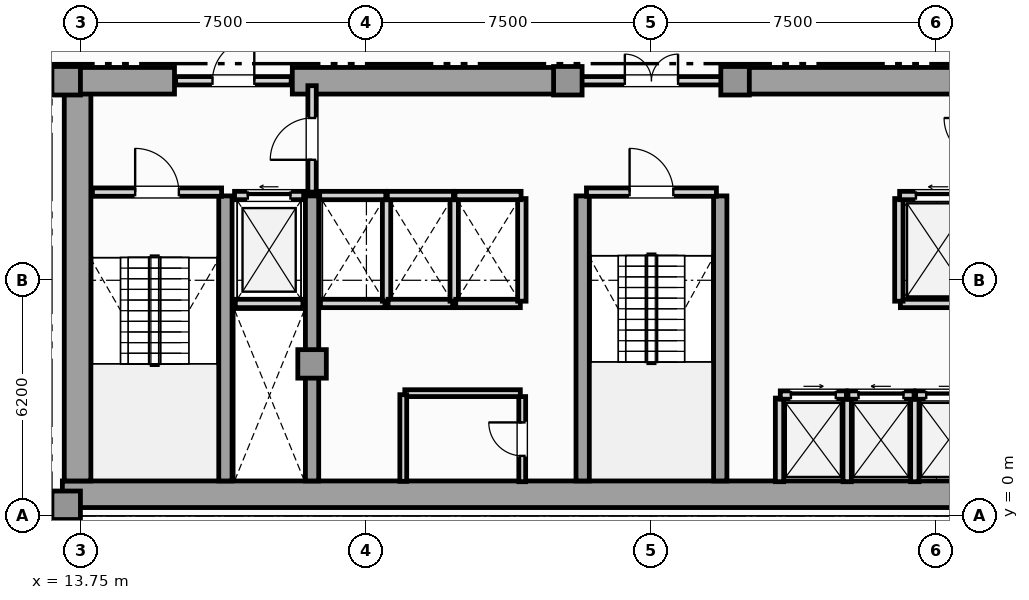
"""IFC4 building model, lengths in metres.
Left out: names, types, materials, properties, quantities, classifications, styles, units other than length and angle.
Written with IfcOpenShell. Run it as: python <this file> out.ifc"""

import sys

from ifc_helpers import new_model, si_unit, direction, frame, frame_2d, origin, origin_2d, place, context, subcontext, project, spatial, rectangle, extrude, element, fill, save


model = new_model("IFC4")
c1 = context("Model", 3, precision=1e-05, world=origin(), true_north=direction((0.0, 1.0)))
c2 = subcontext(c1, "Body", "Model", "MODEL_VIEW")
j1 = project(units=[si_unit("LENGTHUNIT", "METRE"), si_unit("PLANEANGLEUNIT", "RADIAN")], contexts=[c1])
p1 = place(None, origin())
s1 = spatial("IfcSite", under=j1, at=p1, CompositionType="ELEMENT")
p2 = place(p1, origin())
s2 = spatial("IfcBuilding", under=s1, at=p2, CompositionType="ELEMENT")
p3 = place(p2, frame((0.0, 0.0, 145.2)))
s3 = spatial("IfcBuildingStorey", under=s2, at=p3, CompositionType="ELEMENT", Elevation=145.2)
p4 = place(p3, frame((13.25, 0.57, 0.0), z_axis=(0.0, 0.0, 1.0), x_axis=(1.0, 0.0, 0.0)))
e1 = element("IfcWall", 1, at=p4, inside=s3, PredefinedType="SHEAR", context=c2, shape_type="SweptSolid", body=[
    extrude(rectangle(XDim=31.0, YDim=0.7, at=frame_2d((15.5, 0.0))), origin(), (0.0, 0.0, 1.0), 3.63),
])
p5 = place(p3, frame((13.65, 0.92, 0.0), z_axis=(0.0, 0.0, 1.0), x_axis=(0.0, 1.0, 0.0)))
e2 = element("IfcWall", 2, at=p5, inside=s3, PredefinedType="SHEAR", context=c2, shape_type="SweptSolid", body=[
    extrude(rectangle(XDim=10.53, YDim=0.7, at=frame_2d((5.265, 0.0))), origin(), (0.0, 0.0, 1.0), 3.63),
])
p6 = place(p3, frame((13.25, 11.45, 0.0), z_axis=(0.0, 0.0, 1.0), x_axis=(1.0, 0.0, 0.0)))
e3 = element("IfcWall", 3, at=p6, inside=s3, PredefinedType="SHEAR", context=c2, shape_type="SweptSolid", body=[
    extrude(rectangle(XDim=2.95, YDim=0.7, at=frame_2d((1.475, 0.0))), origin(), (0.0, 0.0, 1.0), 3.63),
])
for number, where, z_axis, x_axis in (
    (4, (19.3, 11.45, 0.0), (0.0, 0.0, 1.0), (1.0, 0.0, 0.0)),
    (5, (30.9, 11.45, 0.0), (0.0, 0.0, 1.0), (1.0, 0.0, 0.0)),
):
    element("IfcWall", number, at=place(p3, frame(where, z_axis=z_axis, x_axis=x_axis)), inside=s3, PredefinedType="SHEAR", context=c2, shape_type="SweptSolid", body=[
        extrude(rectangle(XDim=7.3, YDim=0.7, at=frame_2d((3.65, 0.0))), origin(), (0.0, 0.0, 1.0), 3.63),
    ])
for number, where, z_axis, x_axis in (
    (6, (17.54, 0.92, 0.0), (0.0, 0.0, 1.0), (0.0, 1.0, 0.0)),
    (7, (19.82, 0.92, 0.0), (0.0, 0.0, 1.0), (0.0, 1.0, 0.0)),
    (8, (26.94, 0.92, 0.0), (0.0, 0.0, 1.0), (0.0, 1.0, 0.0)),
    (9, (30.56, 0.92, 0.0), (0.0, 0.0, 1.0), (0.0, 1.0, 0.0)),
):
    element("IfcWall", number, at=place(p3, frame(where, z_axis=z_axis, x_axis=x_axis)), inside=s3, PredefinedType="SHEAR", context=c2, shape_type="SweptSolid", body=[
        extrude(rectangle(XDim=7.5, YDim=0.35, at=frame_2d((3.75, 0.0))), origin(), (0.0, 0.0, 1.0), 3.63),
    ])
for number, where, z_axis, x_axis in (
    (10, (13.35, 0.28, 0.0), (0.0, 0.0, 1.0), (1.0, 0.0, 0.0)),
    (11, (13.35, 11.45, 0.0), (0.0, 0.0, 1.0), (1.0, 0.0, 0.0)),
    (12, (19.82, 4.0, 0.0), (0.0, 0.0, 1.0), (1.0, 0.0, 0.0)),
    (13, (26.55, 11.45, 0.0), (0.0, 0.0, 1.0), (1.0, 0.0, 0.0)),
    (14, (30.95, 11.45, 0.0), (0.0, 0.0, 1.0), (1.0, 0.0, 0.0)),
):
    element("IfcColumn", number, at=place(p3, frame(where, z_axis=z_axis, x_axis=x_axis)), inside=s3, PredefinedType="COLUMN", context=c2, shape_type="SweptSolid", body=[
        extrude(rectangle(XDim=0.75, YDim=0.75, at=origin_2d()), origin(), (0.0, 0.0, 1.0), 3.85),
    ])
p7 = place(p3, frame((5.84, 0.18, 0.0), z_axis=(0.0, 0.0, 1.0), x_axis=(1.0, 0.0, 0.0)))
e15 = element("IfcWall", 15, at=p7, inside=s3, PredefinedType="SOLIDWALL", context=c2, shape_type="SweptSolid", body=[
    extrude(rectangle(XDim=7.41, YDim=0.3, at=frame_2d((3.705, 0.0))), origin(), (0.0, 0.0, 1.0), 3.63),
])
p8 = place(p7, frame((2.655, 0.0, 0.85)))
e16 = element("IfcOpeningElement", 16, at=p8, cuts=e15, PredefinedType="OPENING", context=c2, shape_type="SweptSolid", body=[
    extrude(rectangle(XDim=2.1, YDim=2.05, at=frame_2d((1.05, 1.025))), frame((0.0, 0.16, 0.0), z_axis=(0.0, -1.0, 0.0), x_axis=(1.0, 0.0, 0.0)), (0.0, 0.0, 1.0), 0.32),
])
p9 = place(p3, frame((17.8, 5.59, 0.0), z_axis=(0.0, 0.0, 1.0), x_axis=(1.0, 0.0, 0.0)))
e17 = element("IfcWall", 17, at=p9, inside=s3, PredefinedType="SOLIDWALL", context=c2, shape_type="SweptSolid", body=[
    extrude(rectangle(XDim=1.78, YDim=0.22, at=frame_2d((0.89, 0.0))), origin(), (0.0, 0.0, 1.0), 3.63),
])
p10 = place(p3, frame((17.78, 8.43, 0.0), z_axis=(0.0, 0.0, 1.0), x_axis=(1.0, 0.0, 0.0)))
e18 = element("IfcWall", 18, at=p10, inside=s3, PredefinedType="SOLIDWALL", context=c2, shape_type="SweptSolid", body=[
    extrude(rectangle(XDim=1.82, YDim=0.22, at=frame_2d((0.91, 0.0))), origin(), (0.0, 0.0, 1.0), 3.63),
])
p11 = place(p10, frame((0.35, 0.0, 0.0)))
e19 = element("IfcOpeningElement", 19, at=p11, cuts=e18, PredefinedType="OPENING", context=c2, shape_type="SweptSolid", body=[
    extrude(rectangle(XDim=1.12, YDim=2.25, at=frame_2d((0.56, 1.125))), frame((0.0, 0.12, 0.0), z_axis=(0.0, -1.0, 0.0), x_axis=(1.0, 0.0, 0.0)), (0.0, 0.0, 1.0), 0.24),
])
p12 = place(p3, frame((35.3, 5.59, 0.0), z_axis=(0.0, 0.0, 1.0), x_axis=(1.0, 0.0, 0.0)))
e20 = element("IfcWall", 20, at=p12, inside=s3, PredefinedType="SOLIDWALL", context=c2, shape_type="SweptSolid", body=[
    extrude(rectangle(XDim=2.0, YDim=0.22, at=frame_2d((1.0, 0.0))), origin(), (0.0, 0.0, 1.0), 3.63),
])
p13 = place(p3, frame((35.26, 5.65, 0.0), z_axis=(0.0, 0.0, 1.0), x_axis=(0.0, 1.0, 0.0)))
e21 = element("IfcWall", 21, at=p13, inside=s3, PredefinedType="SOLIDWALL", context=c2, shape_type="SweptSolid", body=[
    extrude(rectangle(XDim=2.7, YDim=0.22, at=frame_2d((1.35, 0.0))), origin(), (0.0, 0.0, 1.0), 3.63),
])
p14 = place(p3, frame((35.28, 8.43, 0.0), z_axis=(0.0, 0.0, 1.0), x_axis=(1.0, 0.0, 0.0)))
e22 = element("IfcWall", 22, at=p14, inside=s3, PredefinedType="SOLIDWALL", context=c2, shape_type="SweptSolid", body=[
    extrude(rectangle(XDim=2.04, YDim=0.22, at=frame_2d((1.02, 0.0))), origin(), (0.0, 0.0, 1.0), 3.63),
])
p15 = place(p14, frame((0.43, 0.0, 0.0)))
e23 = element("IfcOpeningElement", 23, at=p15, cuts=e22, PredefinedType="OPENING", context=c2, shape_type="SweptSolid", body=[
    extrude(rectangle(XDim=1.18, YDim=2.2, at=frame_2d((0.59, 1.1))), frame((0.0, 0.12, 0.0), z_axis=(0.0, -1.0, 0.0), x_axis=(1.0, 0.0, 0.0)), (0.0, 0.0, 1.0), 0.24),
])
for number, where, z_axis, x_axis in (
    (24, (32.12, 0.9, 0.0), (0.0, 0.0, 1.0), (0.0, 1.0, 0.0)),
    (25, (33.9, 0.9, 0.0), (0.0, 0.0, 1.0), (0.0, 1.0, 0.0)),
):
    element("IfcWall", number, at=place(p3, frame(where, z_axis=z_axis, x_axis=x_axis)), inside=s3, PredefinedType="SOLIDWALL", context=c2, shape_type="SweptSolid", body=[
        extrude(rectangle(XDim=2.2, YDim=0.22, at=frame_2d((1.1, 0.0))), origin(), (0.0, 0.0, 1.0), 3.63),
    ])
p16 = place(p3, frame((32.14, 3.18, 0.0), z_axis=(0.0, 0.0, 1.0), x_axis=(1.0, 0.0, 0.0)))
e26 = element("IfcWall", 26, at=p16, inside=s3, PredefinedType="SOLIDWALL", context=c2, shape_type="SweptSolid", body=[
    extrude(rectangle(XDim=1.74, YDim=0.22, at=frame_2d((0.87, 0.0))), origin(), (0.0, 0.0, 1.0), 3.63),
])
p17 = place(p16, frame((0.28, 0.0, 0.0)))
e27 = element("IfcOpeningElement", 27, at=p17, cuts=e26, PredefinedType="OPENING", context=c2, shape_type="SweptSolid", body=[
    extrude(rectangle(XDim=1.18, YDim=2.2, at=frame_2d((0.59, 1.1))), frame((0.0, 0.12, 0.0), z_axis=(0.0, -1.0, 0.0), x_axis=(1.0, 0.0, 0.0)), (0.0, 0.0, 1.0), 0.24),
])
p18 = place(p3, frame((35.68, 0.9, 0.0), z_axis=(0.0, 0.0, 1.0), x_axis=(0.0, 1.0, 0.0)))
e28 = element("IfcWall", 28, at=p18, inside=s3, PredefinedType="SOLIDWALL", context=c2, shape_type="SweptSolid", body=[
    extrude(rectangle(XDim=2.2, YDim=0.22, at=frame_2d((1.1, 0.0))), origin(), (0.0, 0.0, 1.0), 3.63),
])
p19 = place(p3, frame((33.92, 3.18, 0.0), z_axis=(0.0, 0.0, 1.0), x_axis=(1.0, 0.0, 0.0)))
e29 = element("IfcWall", 29, at=p19, inside=s3, PredefinedType="SOLIDWALL", context=c2, shape_type="SweptSolid", body=[
    extrude(rectangle(XDim=1.74, YDim=0.22, at=frame_2d((0.87, 0.0))), origin(), (0.0, 0.0, 1.0), 3.63),
])
p20 = place(p19, frame((0.28, 0.0, 0.0)))
e30 = element("IfcOpeningElement", 30, at=p20, cuts=e29, PredefinedType="OPENING", context=c2, shape_type="SweptSolid", body=[
    extrude(rectangle(XDim=1.18, YDim=2.2, at=frame_2d((0.59, 1.1))), frame((0.0, 0.12, 0.0), z_axis=(0.0, -1.0, 0.0), x_axis=(1.0, 0.0, 0.0)), (0.0, 0.0, 1.0), 0.24),
])
p21 = place(p3, frame((35.7, 3.18, 0.0), z_axis=(0.0, 0.0, 1.0), x_axis=(1.0, 0.0, 0.0)))
e31 = element("IfcWall", 31, at=p21, inside=s3, PredefinedType="SOLIDWALL", context=c2, shape_type="SweptSolid", body=[
    extrude(rectangle(XDim=1.74, YDim=0.22, at=frame_2d((0.87, 0.0))), origin(), (0.0, 0.0, 1.0), 3.63),
])
p22 = place(p21, frame((0.28, 0.0, 0.0)))
e32 = element("IfcOpeningElement", 32, at=p22, cuts=e31, PredefinedType="OPENING", context=c2, shape_type="SweptSolid", body=[
    extrude(rectangle(XDim=1.18, YDim=2.2, at=frame_2d((0.59, 1.1))), frame((0.0, 0.12, 0.0), z_axis=(0.0, -1.0, 0.0), x_axis=(1.0, 0.0, 0.0)), (0.0, 0.0, 1.0), 0.24),
])
p23 = place(p3, frame((20.04, 5.59, 0.0), z_axis=(0.0, 0.0, 1.0), x_axis=(1.0, 0.0, 0.0)))
e33 = element("IfcWall", 33, at=p23, inside=s3, PredefinedType="SOLIDWALL", context=c2, shape_type="SweptSolid", body=[
    extrude(rectangle(XDim=1.7, YDim=0.22, at=frame_2d((0.85, 0.0))), origin(), (0.0, 0.0, 1.0), 3.63),
])
p24 = place(p3, frame((21.78, 5.65, 0.0), z_axis=(0.0, 0.0, 1.0), x_axis=(0.0, 1.0, 0.0)))
e34 = element("IfcWall", 34, at=p24, inside=s3, PredefinedType="SOLIDWALL", context=c2, shape_type="SweptSolid", body=[
    extrude(rectangle(XDim=2.7, YDim=0.22, at=frame_2d((1.35, 0.0))), origin(), (0.0, 0.0, 1.0), 3.63),
])
p25 = place(p3, frame((20.02, 8.43, 0.0), z_axis=(0.0, 0.0, 1.0), x_axis=(1.0, 0.0, 0.0)))
e35 = element("IfcWall", 35, at=p25, inside=s3, PredefinedType="SOLIDWALL", context=c2, shape_type="SweptSolid", body=[
    extrude(rectangle(XDim=1.74, YDim=0.22, at=frame_2d((0.87, 0.0))), origin(), (0.0, 0.0, 1.0), 3.63),
])
p26 = place(p3, frame((21.82, 5.59, 0.0), z_axis=(0.0, 0.0, 1.0), x_axis=(1.0, 0.0, 0.0)))
e36 = element("IfcWall", 36, at=p26, inside=s3, PredefinedType="SOLIDWALL", context=c2, shape_type="SweptSolid", body=[
    extrude(rectangle(XDim=1.7, YDim=0.22, at=frame_2d((0.85, 0.0))), origin(), (0.0, 0.0, 1.0), 3.63),
])
p27 = place(p3, frame((23.56, 5.65, 0.0), z_axis=(0.0, 0.0, 1.0), x_axis=(0.0, 1.0, 0.0)))
e37 = element("IfcWall", 37, at=p27, inside=s3, PredefinedType="SOLIDWALL", context=c2, shape_type="SweptSolid", body=[
    extrude(rectangle(XDim=2.7, YDim=0.22, at=frame_2d((1.35, 0.0))), origin(), (0.0, 0.0, 1.0), 3.63),
])
p28 = place(p3, frame((21.8, 8.43, 0.0), z_axis=(0.0, 0.0, 1.0), x_axis=(1.0, 0.0, 0.0)))
e38 = element("IfcWall", 38, at=p28, inside=s3, PredefinedType="SOLIDWALL", context=c2, shape_type="SweptSolid", body=[
    extrude(rectangle(XDim=1.74, YDim=0.22, at=frame_2d((0.87, 0.0))), origin(), (0.0, 0.0, 1.0), 3.63),
])
p29 = place(p3, frame((23.6, 5.59, 0.0), z_axis=(0.0, 0.0, 1.0), x_axis=(1.0, 0.0, 0.0)))
e39 = element("IfcWall", 39, at=p29, inside=s3, PredefinedType="SOLIDWALL", context=c2, shape_type="SweptSolid", body=[
    extrude(rectangle(XDim=1.7, YDim=0.22, at=frame_2d((0.85, 0.0))), origin(), (0.0, 0.0, 1.0), 3.63),
])
p30 = place(p3, frame((25.34, 5.65, 0.0), z_axis=(0.0, 0.0, 1.0), x_axis=(0.0, 1.0, 0.0)))
e40 = element("IfcWall", 40, at=p30, inside=s3, PredefinedType="SOLIDWALL", context=c2, shape_type="SweptSolid", body=[
    extrude(rectangle(XDim=2.7, YDim=0.22, at=frame_2d((1.35, 0.0))), origin(), (0.0, 0.0, 1.0), 3.63),
])
p31 = place(p3, frame((23.58, 8.43, 0.0), z_axis=(0.0, 0.0, 1.0), x_axis=(1.0, 0.0, 0.0)))
e41 = element("IfcWall", 41, at=p31, inside=s3, PredefinedType="SOLIDWALL", context=c2, shape_type="SweptSolid", body=[
    extrude(rectangle(XDim=1.74, YDim=0.22, at=frame_2d((0.87, 0.0))), origin(), (0.0, 0.0, 1.0), 3.63),
])
p32 = place(p3, frame((14.04, 8.52, 0.0), z_axis=(0.0, 0.0, 1.0), x_axis=(1.0, 0.0, 0.0)))
e42 = element("IfcWall", 42, at=p32, inside=s3, PredefinedType="SOLIDWALL", context=c2, shape_type="SweptSolid", body=[
    extrude(rectangle(XDim=3.4, YDim=0.22, at=frame_2d((1.7, 0.0))), origin(), (0.0, 0.0, 1.0), 3.63),
])
p33 = place(p32, frame((1.125, 0.0, 0.0)))
e43 = element("IfcOpeningElement", 43, at=p33, cuts=e42, PredefinedType="OPENING", context=c2, shape_type="SweptSolid", body=[
    extrude(rectangle(XDim=1.15, YDim=2.2, at=frame_2d((0.575, 1.1))), frame((0.0, 0.12, 0.0), z_axis=(0.0, -1.0, 0.0), x_axis=(1.0, 0.0, 0.0)), (0.0, 0.0, 1.0), 0.24),
])
p34 = place(p3, frame((27.04, 8.52, 0.0), z_axis=(0.0, 0.0, 1.0), x_axis=(1.0, 0.0, 0.0)))
e44 = element("IfcWall", 44, at=p34, inside=s3, PredefinedType="SOLIDWALL", context=c2, shape_type="SweptSolid", body=[
    extrude(rectangle(XDim=3.42, YDim=0.22, at=frame_2d((1.71, 0.0))), origin(), (0.0, 0.0, 1.0), 3.63),
])
p35 = place(p34, frame((1.135, 0.0, 0.0)))
e45 = element("IfcOpeningElement", 45, at=p35, cuts=e44, PredefinedType="OPENING", context=c2, shape_type="SweptSolid", body=[
    extrude(rectangle(XDim=1.15, YDim=2.2, at=frame_2d((0.575, 1.1))), frame((0.0, 0.12, 0.0), z_axis=(0.0, -1.0, 0.0), x_axis=(1.0, 0.0, 0.0)), (0.0, 0.0, 1.0), 0.24),
])
p36 = place(p3, frame((19.82, 8.52, 0.0), z_axis=(0.0, 0.0, 1.0), x_axis=(0.0, 1.0, 0.0)))
e46 = element("IfcWall", 46, at=p36, inside=s3, PredefinedType="SOLIDWALL", context=c2, shape_type="SweptSolid", body=[
    extrude(rectangle(XDim=2.8, YDim=0.22, at=frame_2d((1.4, 0.0))), origin(), (0.0, 0.0, 1.0), 3.085),
])
p37 = place(p36, frame((0.85, 0.0, 0.0)))
e47 = element("IfcOpeningElement", 47, at=p37, cuts=e46, PredefinedType="OPENING", context=c2, shape_type="SweptSolid", body=[
    extrude(rectangle(XDim=1.1, YDim=2.2, at=frame_2d((0.55, 1.1))), frame((0.0, 0.12, 0.0), z_axis=(0.0, -1.0, 0.0), x_axis=(1.0, 0.0, 0.0)), (0.0, 0.0, 1.0), 0.24),
])
p38 = place(p3, frame((16.23, 11.45, 0.0), z_axis=(0.0, 0.0, 1.0), x_axis=(1.0, 0.0, 0.0)))
e48 = element("IfcWall", 48, at=p38, inside=s3, PredefinedType="SOLIDWALL", context=c2, shape_type="SweptSolid", body=[
    extrude(rectangle(XDim=3.04, YDim=0.22, at=frame_2d((1.52, 0.0))), origin(), (0.0, 0.0, 1.0), 3.63),
])
p39 = place(p38, frame((0.97, 0.0, 0.0)))
e49 = element("IfcOpeningElement", 49, at=p39, cuts=e48, PredefinedType="OPENING", context=c2, shape_type="SweptSolid", body=[
    extrude(rectangle(XDim=1.1, YDim=2.2, at=frame_2d((0.55, 1.1))), frame((0.0, 0.12, 0.0), z_axis=(0.0, -1.0, 0.0), x_axis=(1.0, 0.0, 0.0)), (0.0, 0.0, 1.0), 0.24),
])
p40 = place(p3, frame((26.63, 11.45, 0.0), z_axis=(0.0, 0.0, 1.0), x_axis=(1.0, 0.0, 0.0)))
e50 = element("IfcWall", 50, at=p40, inside=s3, PredefinedType="SOLIDWALL", context=c2, shape_type="SweptSolid", body=[
    extrude(rectangle(XDim=4.24, YDim=0.22, at=frame_2d((2.12, 0.0))), origin(), (0.0, 0.0, 1.0), 3.63),
])
p41 = place(p40, frame((1.42, 0.0, 0.0)))
e51 = element("IfcOpeningElement", 51, at=p41, cuts=e50, PredefinedType="OPENING", context=c2, shape_type="SweptSolid", body=[
    extrude(rectangle(XDim=1.4, YDim=2.2, at=frame_2d((0.7, 1.1))), frame((0.0, 0.12, 0.0), z_axis=(0.0, -1.0, 0.0), x_axis=(1.0, 0.0, 0.0)), (0.0, 0.0, 1.0), 0.24),
])
p42 = place(p3, frame((25.35, 0.9, 0.0), z_axis=(0.0, 0.0, 1.0), x_axis=(0.0, 1.0, 0.0)))
e52 = element("IfcWall", 52, at=p42, inside=s3, PredefinedType="PARTITIONING", context=c2, shape_type="SweptSolid", body=[
    extrude(rectangle(XDim=2.24, YDim=0.18, at=frame_2d((1.12, 0.0))), origin(), (0.0, 0.0, 1.0), 3.63),
])
p43 = place(p42, frame((0.68, 0.0, 0.0)))
e53 = element("IfcOpeningElement", 53, at=p43, cuts=e52, PredefinedType="OPENING", context=c2, shape_type="SweptSolid", body=[
    extrude(rectangle(XDim=0.88, YDim=2.05, at=frame_2d((0.44, 1.025))), frame((0.0, 0.1, 0.0), z_axis=(0.0, -1.0, 0.0), x_axis=(1.0, 0.0, 0.0)), (0.0, 0.0, 1.0), 0.2),
])
p44 = place(p3, frame((22.26, 3.23, 0.0), z_axis=(0.0, 0.0, 1.0), x_axis=(1.0, 0.0, 0.0)))
e54 = element("IfcWall", 54, at=p44, inside=s3, PredefinedType="PARTITIONING", context=c2, shape_type="SweptSolid", body=[
    extrude(rectangle(XDim=3.04, YDim=0.18, at=frame_2d((1.52, 0.0))), origin(), (0.0, 0.0, 1.0), 3.63),
])
p45 = place(p3, frame((22.22, 0.91, 0.0), z_axis=(0.0, 0.0, 1.0), x_axis=(0.0, 1.0, 0.0)))
e55 = element("IfcWall", 55, at=p45, inside=s3, PredefinedType="PARTITIONING", context=c2, shape_type="SweptSolid", body=[
    extrude(rectangle(XDim=2.28, YDim=0.18, at=frame_2d((1.14, 0.0))), origin(), (0.0, 0.0, 1.0), 3.63),
])
p46 = place(p3, frame((6.105, 11.6, 0.0), z_axis=(0.0, 0.0, 1.0), x_axis=(1.0, 0.0, 0.0)))
e56 = element("IfcWall", 56, at=p46, inside=s3, PredefinedType="PARTITIONING", context=c2, shape_type="SweptSolid", body=[
    extrude(rectangle(XDim=7.04, YDim=0.18, at=frame_2d((3.52, 0.0))), origin(), (0.0, 0.0, 1.0), 3.63),
])
p47 = place(p46, frame((3.02, 0.0, 0.0)))
e57 = element("IfcOpeningElement", 57, at=p47, cuts=e56, PredefinedType="OPENING", context=c2, shape_type="SweptSolid", body=[
    extrude(rectangle(XDim=1.0, YDim=2.15, at=frame_2d((0.5, 1.075))), frame((0.0, 0.1, 0.0), z_axis=(0.0, -1.0, 0.0), x_axis=(1.0, 0.0, 0.0)), (0.0, 0.0, 1.0), 0.2),
])
p48 = place(p11, origin())
e58 = element("IfcDoor", 58, at=p48, inside=s3, OperationType="SLIDING_TO_LEFT", PredefinedType="DOOR", context=c2, shape_type="SweptSolid", body=[
    extrude(rectangle(XDim=1.12, YDim=2.25, at=frame_2d((0.56, 1.125))), frame((0.0, 0.025, 0.0), z_axis=(0.0, -1.0, 0.0), x_axis=(1.0, 0.0, 0.0)), (0.0, 0.0, 1.0), 0.05),
])
fill(e19, e58)
p49 = place(p15, origin())
e59 = element("IfcDoor", 59, at=p49, inside=s3, OperationType="SLIDING_TO_LEFT", PredefinedType="DOOR", context=c2, shape_type="SweptSolid", body=[
    extrude(rectangle(XDim=1.18, YDim=2.2, at=frame_2d((0.59, 1.1))), frame((0.0, 0.025, 0.0), z_axis=(0.0, -1.0, 0.0), x_axis=(1.0, 0.0, 0.0)), (0.0, 0.0, 1.0), 0.05),
])
fill(e23, e59)
p50 = place(p17, origin())
e60 = element("IfcDoor", 60, at=p50, inside=s3, OperationType="SLIDING_TO_RIGHT", PredefinedType="DOOR", context=c2, shape_type="SweptSolid", body=[
    extrude(rectangle(XDim=1.18, YDim=2.2, at=frame_2d((0.59, 1.1))), frame((0.0, 0.025, 0.0), z_axis=(0.0, -1.0, 0.0), x_axis=(1.0, 0.0, 0.0)), (0.0, 0.0, 1.0), 0.05),
])
fill(e27, e60)
p51 = place(p20, origin())
e61 = element("IfcDoor", 61, at=p51, inside=s3, OperationType="SLIDING_TO_LEFT", PredefinedType="DOOR", context=c2, shape_type="SweptSolid", body=[
    extrude(rectangle(XDim=1.18, YDim=2.2, at=frame_2d((0.59, 1.1))), frame((0.0, 0.025, 0.0), z_axis=(0.0, -1.0, 0.0), x_axis=(1.0, 0.0, 0.0)), (0.0, 0.0, 1.0), 0.05),
])
fill(e30, e61)
p52 = place(p22, origin())
e62 = element("IfcDoor", 62, at=p52, inside=s3, OperationType="SLIDING_TO_RIGHT", PredefinedType="DOOR", context=c2, shape_type="SweptSolid", body=[
    extrude(rectangle(XDim=1.18, YDim=2.2, at=frame_2d((0.59, 1.1))), frame((0.0, 0.025, 0.0), z_axis=(0.0, -1.0, 0.0), x_axis=(1.0, 0.0, 0.0)), (0.0, 0.0, 1.0), 0.05),
])
fill(e32, e62)
p53 = place(p33, origin())
e63 = element("IfcDoor", 63, at=p53, inside=s3, OperationType="SINGLE_SWING_LEFT", PredefinedType="DOOR", context=c2, shape_type="SweptSolid", body=[
    extrude(rectangle(XDim=1.15, YDim=2.2, at=frame_2d((0.575, 1.1))), frame((0.0, 0.025, 0.0), z_axis=(0.0, -1.0, 0.0), x_axis=(1.0, 0.0, 0.0)), (0.0, 0.0, 1.0), 0.05),
])
fill(e43, e63)
p54 = place(p35, origin())
e64 = element("IfcDoor", 64, at=p54, inside=s3, OperationType="SINGLE_SWING_LEFT", PredefinedType="DOOR", context=c2, shape_type="SweptSolid", body=[
    extrude(rectangle(XDim=1.15, YDim=2.2, at=frame_2d((0.575, 1.1))), frame((0.0, 0.025, 0.0), z_axis=(0.0, -1.0, 0.0), x_axis=(1.0, 0.0, 0.0)), (0.0, 0.0, 1.0), 0.05),
])
fill(e45, e64)
p55 = place(p37, origin())
e65 = element("IfcDoor", 65, at=p55, inside=s3, OperationType="SINGLE_SWING_LEFT", PredefinedType="DOOR", context=c2, shape_type="SweptSolid", body=[
    extrude(rectangle(XDim=1.1, YDim=2.2, at=frame_2d((0.55, 1.1))), frame((0.0, 0.025, 0.0), z_axis=(0.0, -1.0, 0.0), x_axis=(1.0, 0.0, 0.0)), (0.0, 0.0, 1.0), 0.05),
])
fill(e47, e65)
p56 = place(p39, origin())
e66 = element("IfcDoor", 66, at=p56, inside=s3, OperationType="SINGLE_SWING_RIGHT", PredefinedType="DOOR", context=c2, shape_type="SweptSolid", body=[
    extrude(rectangle(XDim=1.1, YDim=2.2, at=frame_2d((0.55, 1.1))), frame((0.0, 0.025, 0.0), z_axis=(0.0, -1.0, 0.0), x_axis=(1.0, 0.0, 0.0)), (0.0, 0.0, 1.0), 0.05),
])
fill(e49, e66)
p57 = place(p41, origin())
e67 = element("IfcDoor", 67, at=p57, inside=s3, OperationType="DOUBLE_DOOR_SINGLE_SWING", PredefinedType="DOOR", context=c2, shape_type="SweptSolid", body=[
    extrude(rectangle(XDim=1.4, YDim=2.2, at=frame_2d((0.7, 1.1))), frame((0.0, 0.025, 0.0), z_axis=(0.0, -1.0, 0.0), x_axis=(1.0, 0.0, 0.0)), (0.0, 0.0, 1.0), 0.05),
])
fill(e51, e67)
p58 = place(p43, origin())
e68 = element("IfcDoor", 68, at=p58, inside=s3, OperationType="SINGLE_SWING_RIGHT", PredefinedType="DOOR", context=c2, shape_type="SweptSolid", body=[
    extrude(rectangle(XDim=0.88, YDim=2.05, at=frame_2d((0.44, 1.025))), frame((0.0, 0.025, 0.0), z_axis=(0.0, -1.0, 0.0), x_axis=(1.0, 0.0, 0.0)), (0.0, 0.0, 1.0), 0.05),
])
fill(e53, e68)
save(model, sys.argv[1])
